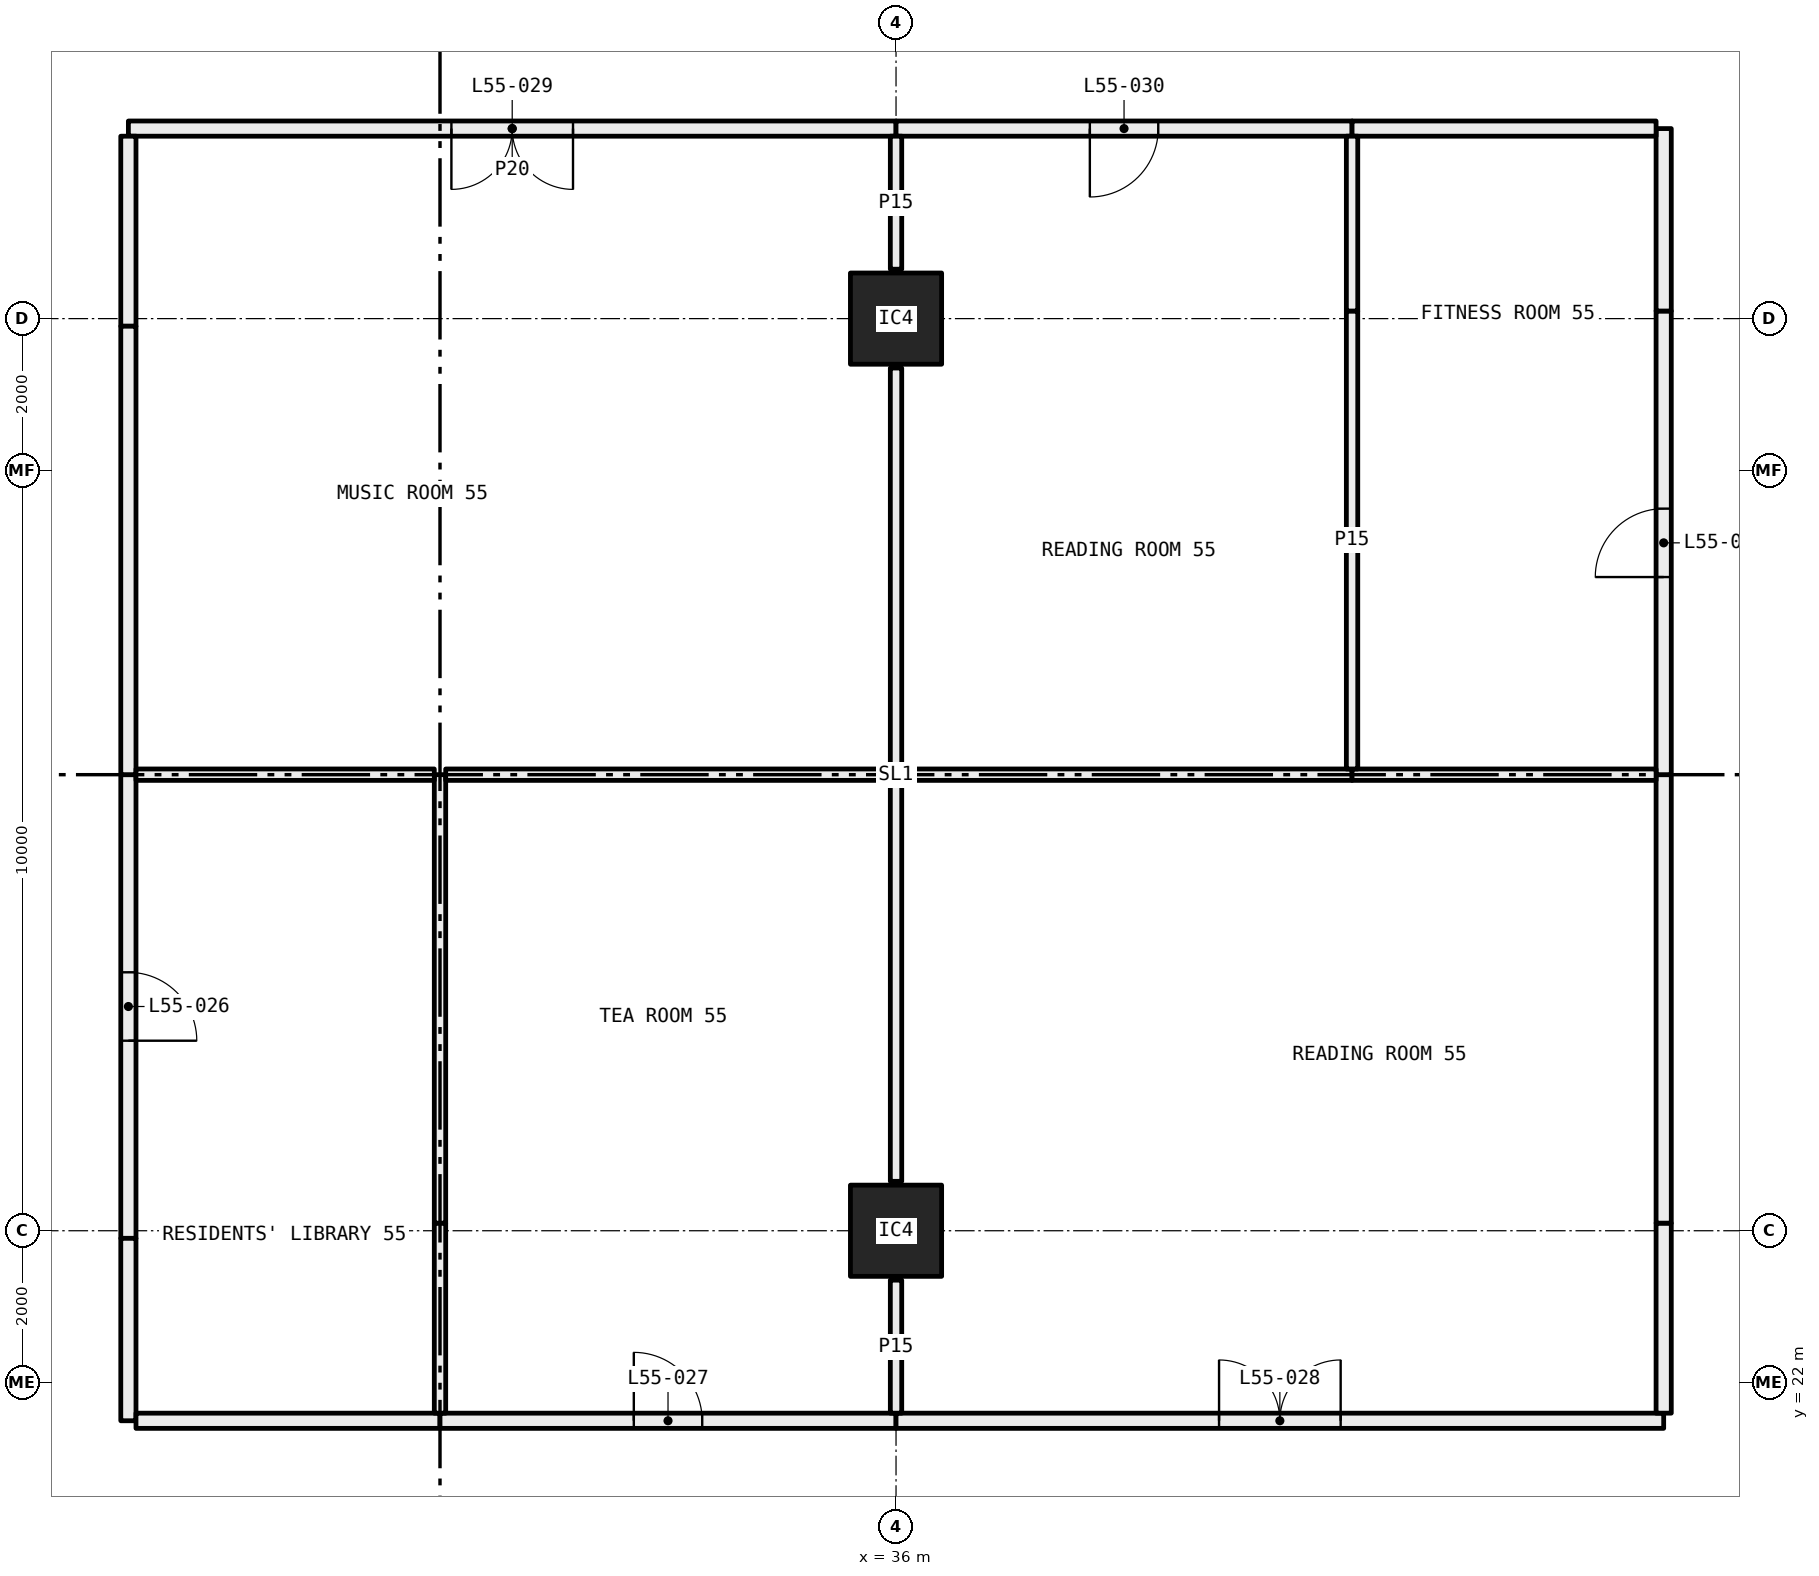
"""IFC4 building model, lengths in metres.
Left out: names, types, materials, properties, quantities, classifications, styles, units other than length and angle.
Written with IfcOpenShell. Run it as: python <this file> out.ifc"""

import sys

from ifc_helpers import new_model, si_unit, direction, frame, frame_2d, origin, origin_2d, place, context, subcontext, project, spatial, rectangle, hollow_rectangle, extrude, element, fill, save


model = new_model("IFC4")
c1 = context("Model", 3, precision=1e-05, world=origin(), true_north=direction((0.0, 1.0)))
c2 = subcontext(c1, "Body", "Model", "MODEL_VIEW")
j1 = project(units=[si_unit("LENGTHUNIT", "METRE"), si_unit("PLANEANGLEUNIT", "RADIAN")], contexts=[c1])
p1 = place(None, origin())
s1 = spatial("IfcSite", under=j1, at=p1, CompositionType="ELEMENT")
p2 = place(p1, origin())
s2 = spatial("IfcBuilding", under=s1, at=p2, CompositionType="ELEMENT")
p3 = place(p2, frame((0.0, 0.0, 206.55)))
s3 = spatial("IfcBuildingStorey", under=s2, at=p3, CompositionType="ELEMENT", Elevation=206.55)
for number, where, z_axis, x_axis in (
    (1, (36.0, 24.0, 0.0), (0.0, 0.0, 1.0), (1.0, 0.0, 0.0)),
    (2, (36.0, 36.0, 0.0), (0.0, 0.0, 1.0), (1.0, 0.0, 0.0)),
):
    element("IfcColumn", number, at=place(p3, frame(where, z_axis=z_axis, x_axis=x_axis)), inside=s3, PredefinedType="COLUMN", context=c2, shape_type="SweptSolid", body=[
        extrude(hollow_rectangle(XDim=1.2, YDim=1.2, WallThickness=0.05, at=origin_2d()), origin(), (0.0, 0.0, 1.0), 3.05),
    ])
p4 = place(p3, frame((25.9, 30.0, 0.0), z_axis=(0.0, 0.0, 1.0), x_axis=(0.0, -1.0, 0.0)))
e3 = element("IfcWall", 3, at=p4, inside=s3, PredefinedType="PARTITIONING", context=c2, shape_type="SweptSolid", body=[
    extrude(rectangle(XDim=6.1, YDim=0.2, at=frame_2d((3.05, 0.0))), origin(), (0.0, 0.0, 1.0), 2.45),
])
p5 = place(p4, frame((2.6, 0.0, 0.0)))
e4 = element("IfcOpeningElement", 4, at=p5, cuts=e3, PredefinedType="OPENING", context=c2, shape_type="SweptSolid", body=[
    extrude(rectangle(XDim=0.9, YDim=2.1, at=frame_2d((0.45, 1.05))), frame((0.0, 0.11, 0.0), z_axis=(0.0, -1.0, 0.0), x_axis=(1.0, 0.0, 0.0)), (0.0, 0.0, 1.0), 0.22),
])
p6 = place(p3, frame((25.9, 23.9, 0.0), z_axis=(0.0, 0.0, 1.0), x_axis=(0.0, -1.0, 0.0)))
e5 = element("IfcWall", 5, at=p6, inside=s3, PredefinedType="PARTITIONING", context=c2, shape_type="SweptSolid", body=[
    extrude(rectangle(XDim=2.4, YDim=0.2, at=frame_2d((1.2, 0.0))), origin(), (0.0, 0.0, 1.0), 3.05),
])
p7 = place(p3, frame((26.0, 21.5, 0.0), z_axis=(0.0, 0.0, 1.0), x_axis=(1.0, 0.0, 0.0)))
e6 = element("IfcWall", 6, at=p7, inside=s3, PredefinedType="PARTITIONING", context=c2, shape_type="SweptSolid", body=[
    extrude(rectangle(XDim=4.0, YDim=0.2, at=frame_2d((2.0, 0.0))), origin(), (0.0, 0.0, 1.0), 3.05),
])
p8 = place(p3, frame((30.0, 21.5, 0.0), z_axis=(0.0, 0.0, 1.0), x_axis=(1.0, 0.0, 0.0)))
e7 = element("IfcWall", 7, at=p8, inside=s3, PredefinedType="PARTITIONING", context=c2, shape_type="SweptSolid", body=[
    extrude(rectangle(XDim=6.0, YDim=0.2, at=frame_2d((3.0, 0.0))), origin(), (0.0, 0.0, 1.0), 2.45),
])
p9 = place(p8, frame((2.55, 0.0, 0.0)))
e8 = element("IfcOpeningElement", 8, at=p9, cuts=e7, PredefinedType="OPENING", context=c2, shape_type="SweptSolid", body=[
    extrude(rectangle(XDim=0.9, YDim=2.1, at=frame_2d((0.45, 1.05))), frame((0.0, 0.11, 0.0), z_axis=(0.0, -1.0, 0.0), x_axis=(1.0, 0.0, 0.0)), (0.0, 0.0, 1.0), 0.22),
])
p10 = place(p3, frame((36.0, 21.5, 0.0), z_axis=(0.0, 0.0, 1.0), x_axis=(1.0, 0.0, 0.0)))
e9 = element("IfcWall", 9, at=p10, inside=s3, PredefinedType="PARTITIONING", context=c2, shape_type="SweptSolid", body=[
    extrude(rectangle(XDim=10.1, YDim=0.2, at=frame_2d((5.05, 0.0))), origin(), (0.0, 0.0, 1.0), 2.45),
])
p11 = place(p10, frame((4.25, 0.0, 0.0)))
e10 = element("IfcOpeningElement", 10, at=p11, cuts=e9, PredefinedType="OPENING", context=c2, shape_type="SweptSolid", body=[
    extrude(rectangle(XDim=1.6, YDim=2.1, at=frame_2d((0.8, 1.05))), frame((0.0, 0.11, 0.0), z_axis=(0.0, -1.0, 0.0), x_axis=(1.0, 0.0, 0.0)), (0.0, 0.0, 1.0), 0.22),
])
p12 = place(p3, frame((46.1, 21.6, 0.0), z_axis=(0.0, 0.0, 1.0), x_axis=(0.0, 1.0, 0.0)))
e11 = element("IfcWall", 11, at=p12, inside=s3, PredefinedType="PARTITIONING", context=c2, shape_type="SweptSolid", body=[
    extrude(rectangle(XDim=2.5, YDim=0.2, at=frame_2d((1.25, 0.0))), origin(), (0.0, 0.0, 1.0), 2.45),
])
p13 = place(p3, frame((46.1, 24.1, 0.0), z_axis=(0.0, 0.0, 1.0), x_axis=(0.0, 1.0, 0.0)))
e12 = element("IfcWall", 12, at=p13, inside=s3, PredefinedType="PARTITIONING", context=c2, shape_type="SweptSolid", body=[
    extrude(rectangle(XDim=5.9, YDim=0.2, at=frame_2d((2.95, 0.0))), origin(), (0.0, 0.0, 1.0), 3.05),
])
p14 = place(p3, frame((36.0, 38.5, 0.0), z_axis=(0.0, 0.0, 1.0), x_axis=(-1.0, 0.0, 0.0)))
e13 = element("IfcWall", 13, at=p14, inside=s3, PredefinedType="PARTITIONING", context=c2, shape_type="SweptSolid", body=[
    extrude(rectangle(XDim=10.1, YDim=0.2, at=frame_2d((5.05, 0.0))), origin(), (0.0, 0.0, 1.0), 2.45),
])
p15 = place(p14, frame((4.25, 0.0, 0.0)))
e14 = element("IfcOpeningElement", 14, at=p15, cuts=e13, PredefinedType="OPENING", context=c2, shape_type="SweptSolid", body=[
    extrude(rectangle(XDim=1.6, YDim=2.1, at=frame_2d((0.8, 1.05))), frame((0.0, 0.11, 0.0), z_axis=(0.0, -1.0, 0.0), x_axis=(1.0, 0.0, 0.0)), (0.0, 0.0, 1.0), 0.22),
])
p16 = place(p3, frame((25.9, 38.4, 0.0), z_axis=(0.0, 0.0, 1.0), x_axis=(0.0, -1.0, 0.0)))
e15 = element("IfcWall", 15, at=p16, inside=s3, PredefinedType="PARTITIONING", context=c2, shape_type="SweptSolid", body=[
    extrude(rectangle(XDim=2.5, YDim=0.2, at=frame_2d((1.25, 0.0))), origin(), (0.0, 0.0, 1.0), 2.45),
])
p17 = place(p3, frame((25.9, 35.9, 0.0), z_axis=(0.0, 0.0, 1.0), x_axis=(0.0, -1.0, 0.0)))
e16 = element("IfcWall", 16, at=p17, inside=s3, PredefinedType="PARTITIONING", context=c2, shape_type="SweptSolid", body=[
    extrude(rectangle(XDim=5.9, YDim=0.2, at=frame_2d((2.95, 0.0))), origin(), (0.0, 0.0, 1.0), 3.05),
])
p18 = place(p3, frame((42.0, 38.5, 0.0), z_axis=(0.0, 0.0, 1.0), x_axis=(-1.0, 0.0, 0.0)))
e17 = element("IfcWall", 17, at=p18, inside=s3, PredefinedType="PARTITIONING", context=c2, shape_type="SweptSolid", body=[
    extrude(rectangle(XDim=6.0, YDim=0.2, at=frame_2d((3.0, 0.0))), origin(), (0.0, 0.0, 1.0), 2.45),
])
p19 = place(p18, frame((2.55, 0.0, 0.0)))
e18 = element("IfcOpeningElement", 18, at=p19, cuts=e17, PredefinedType="OPENING", context=c2, shape_type="SweptSolid", body=[
    extrude(rectangle(XDim=0.9, YDim=2.1, at=frame_2d((0.45, 1.05))), frame((0.0, 0.11, 0.0), z_axis=(0.0, -1.0, 0.0), x_axis=(1.0, 0.0, 0.0)), (0.0, 0.0, 1.0), 0.22),
])
p20 = place(p3, frame((46.1, 30.0, 0.0), z_axis=(0.0, 0.0, 1.0), x_axis=(0.0, 1.0, 0.0)))
e19 = element("IfcWall", 19, at=p20, inside=s3, PredefinedType="PARTITIONING", context=c2, shape_type="SweptSolid", body=[
    extrude(rectangle(XDim=6.1, YDim=0.2, at=frame_2d((3.05, 0.0))), origin(), (0.0, 0.0, 1.0), 2.45),
])
p21 = place(p20, frame((2.6, 0.0, 0.0)))
e20 = element("IfcOpeningElement", 20, at=p21, cuts=e19, PredefinedType="OPENING", context=c2, shape_type="SweptSolid", body=[
    extrude(rectangle(XDim=0.9, YDim=2.1, at=frame_2d((0.45, 1.05))), frame((0.0, 0.11, 0.0), z_axis=(0.0, -1.0, 0.0), x_axis=(1.0, 0.0, 0.0)), (0.0, 0.0, 1.0), 0.22),
])
p22 = place(p3, frame((46.1, 36.1, 0.0), z_axis=(0.0, 0.0, 1.0), x_axis=(0.0, 1.0, 0.0)))
e21 = element("IfcWall", 21, at=p22, inside=s3, PredefinedType="PARTITIONING", context=c2, shape_type="SweptSolid", body=[
    extrude(rectangle(XDim=2.4, YDim=0.2, at=frame_2d((1.2, 0.0))), origin(), (0.0, 0.0, 1.0), 3.05),
])
p23 = place(p3, frame((46.0, 38.5, 0.0), z_axis=(0.0, 0.0, 1.0), x_axis=(-1.0, 0.0, 0.0)))
e22 = element("IfcWall", 22, at=p23, inside=s3, PredefinedType="PARTITIONING", context=c2, shape_type="SweptSolid", body=[
    extrude(rectangle(XDim=4.0, YDim=0.2, at=frame_2d((2.0, 0.0))), origin(), (0.0, 0.0, 1.0), 3.05),
])
p24 = place(p3, frame((30.0, 21.6, 0.0), z_axis=(0.0, 0.0, 1.0), x_axis=(0.0, 1.0, 0.0)))
e23 = element("IfcWall", 23, at=p24, inside=s3, PredefinedType="PARTITIONING", context=c2, shape_type="SweptSolid", body=[
    extrude(rectangle(XDim=2.5, YDim=0.15, at=frame_2d((1.25, 0.0))), origin(), (0.0, 0.0, 1.0), 2.45),
])
p25 = place(p3, frame((30.0, 24.1, 0.0), z_axis=(0.0, 0.0, 1.0), x_axis=(0.0, 1.0, 0.0)))
e24 = element("IfcWall", 24, at=p25, inside=s3, PredefinedType="PARTITIONING", context=c2, shape_type="SweptSolid", body=[
    extrude(rectangle(XDim=5.9, YDim=0.15, at=frame_2d((2.95, 0.0))), origin(), (0.0, 0.0, 1.0), 3.05),
])
p26 = place(p3, frame((29.925, 30.0, 0.0), z_axis=(0.0, 0.0, 1.0), x_axis=(-1.0, 0.0, 0.0)))
e25 = element("IfcWall", 25, at=p26, inside=s3, PredefinedType="PARTITIONING", context=c2, shape_type="SweptSolid", body=[
    extrude(rectangle(XDim=3.925, YDim=0.15, at=frame_2d((1.962, 0.0))), origin(), (0.0, 0.0, 1.0), 3.05),
])
p27 = place(p3, frame((36.0, 21.6, 0.0), z_axis=(0.0, 0.0, 1.0), x_axis=(0.0, 1.0, 0.0)))
e26 = element("IfcWall", 26, at=p27, inside=s3, PredefinedType="PARTITIONING", context=c2, shape_type="SweptSolid", body=[
    extrude(rectangle(XDim=1.75, YDim=0.15, at=frame_2d((0.875, 0.0))), origin(), (0.0, 0.0, 1.0), 2.45),
])
p28 = place(p3, frame((36.0, 24.65, 0.0), z_axis=(0.0, 0.0, 1.0), x_axis=(0.0, 1.0, 0.0)))
e27 = element("IfcWall", 27, at=p28, inside=s3, PredefinedType="PARTITIONING", context=c2, shape_type="SweptSolid", body=[
    extrude(rectangle(XDim=5.35, YDim=0.15, at=frame_2d((2.675, 0.0))), origin(), (0.0, 0.0, 1.0), 2.45),
])
p29 = place(p3, frame((35.925, 30.0, 0.0), z_axis=(0.0, 0.0, 1.0), x_axis=(-1.0, 0.0, 0.0)))
e28 = element("IfcWall", 28, at=p29, inside=s3, PredefinedType="PARTITIONING", context=c2, shape_type="SweptSolid", body=[
    extrude(rectangle(XDim=5.85, YDim=0.15, at=frame_2d((2.925, 0.0))), origin(), (0.0, 0.0, 1.0), 2.45),
])
p30 = place(p3, frame((42.0, 30.0, 0.0), z_axis=(0.0, 0.0, 1.0), x_axis=(-1.0, 0.0, 0.0)))
e29 = element("IfcWall", 29, at=p30, inside=s3, PredefinedType="PARTITIONING", context=c2, shape_type="SweptSolid", body=[
    extrude(rectangle(XDim=5.925, YDim=0.15, at=frame_2d((2.962, 0.0))), origin(), (0.0, 0.0, 1.0), 2.45),
])
p31 = place(p3, frame((46.0, 30.0, 0.0), z_axis=(0.0, 0.0, 1.0), x_axis=(-1.0, 0.0, 0.0)))
e30 = element("IfcWall", 30, at=p31, inside=s3, PredefinedType="PARTITIONING", context=c2, shape_type="SweptSolid", body=[
    extrude(rectangle(XDim=4.0, YDim=0.15, at=frame_2d((2.0, 0.0))), origin(), (0.0, 0.0, 1.0), 3.05),
])
p32 = place(p3, frame((36.0, 30.075, 0.0), z_axis=(0.0, 0.0, 1.0), x_axis=(0.0, 1.0, 0.0)))
e31 = element("IfcWall", 31, at=p32, inside=s3, PredefinedType="PARTITIONING", context=c2, shape_type="SweptSolid", body=[
    extrude(rectangle(XDim=5.275, YDim=0.15, at=frame_2d((2.638, 0.0))), origin(), (0.0, 0.0, 1.0), 2.45),
])
p33 = place(p3, frame((36.0, 36.65, 0.0), z_axis=(0.0, 0.0, 1.0), x_axis=(0.0, 1.0, 0.0)))
e32 = element("IfcWall", 32, at=p33, inside=s3, PredefinedType="PARTITIONING", context=c2, shape_type="SweptSolid", body=[
    extrude(rectangle(XDim=1.75, YDim=0.15, at=frame_2d((0.875, 0.0))), origin(), (0.0, 0.0, 1.0), 2.45),
])
p34 = place(p3, frame((42.0, 30.075, 0.0), z_axis=(0.0, 0.0, 1.0), x_axis=(0.0, 1.0, 0.0)))
e33 = element("IfcWall", 33, at=p34, inside=s3, PredefinedType="PARTITIONING", context=c2, shape_type="SweptSolid", body=[
    extrude(rectangle(XDim=6.025, YDim=0.15, at=frame_2d((3.013, 0.0))), origin(), (0.0, 0.0, 1.0), 2.45),
])
p35 = place(p3, frame((42.0, 36.1, 0.0), z_axis=(0.0, 0.0, 1.0), x_axis=(0.0, 1.0, 0.0)))
e34 = element("IfcWall", 34, at=p35, inside=s3, PredefinedType="PARTITIONING", context=c2, shape_type="SweptSolid", body=[
    extrude(rectangle(XDim=2.3, YDim=0.15, at=frame_2d((1.15, 0.0))), origin(), (0.0, 0.0, 1.0), 3.05),
])
p36 = place(p5, origin())
e35 = element("IfcDoor", 35, at=p36, inside=s3, OperationType="SINGLE_SWING_LEFT", PredefinedType="DOOR", context=c2, shape_type="SweptSolid", body=[
    extrude(rectangle(XDim=0.9, YDim=2.1, at=frame_2d((0.45, 1.05))), frame((0.0, 0.025, 0.0), z_axis=(0.0, -1.0, 0.0), x_axis=(1.0, 0.0, 0.0)), (0.0, 0.0, 1.0), 0.05),
])
fill(e4, e35)
p37 = place(p9, origin())
e36 = element("IfcDoor", 36, at=p37, inside=s3, OperationType="SINGLE_SWING_RIGHT", PredefinedType="DOOR", context=c2, shape_type="SweptSolid", body=[
    extrude(rectangle(XDim=0.9, YDim=2.1, at=frame_2d((0.45, 1.05))), frame((0.0, 0.025, 0.0), z_axis=(0.0, -1.0, 0.0), x_axis=(1.0, 0.0, 0.0)), (0.0, 0.0, 1.0), 0.05),
])
fill(e8, e36)
p38 = place(p11, origin())
e37 = element("IfcDoor", 37, at=p38, inside=s3, OperationType="DOUBLE_DOOR_SINGLE_SWING", PredefinedType="DOOR", context=c2, shape_type="SweptSolid", body=[
    extrude(rectangle(XDim=1.6, YDim=2.1, at=frame_2d((0.8, 1.05))), frame((0.0, 0.025, 0.0), z_axis=(0.0, -1.0, 0.0), x_axis=(1.0, 0.0, 0.0)), (0.0, 0.0, 1.0), 0.05),
])
fill(e10, e37)
p39 = place(p15, origin())
e38 = element("IfcDoor", 38, at=p39, inside=s3, OperationType="DOUBLE_DOOR_SINGLE_SWING", PredefinedType="DOOR", context=c2, shape_type="SweptSolid", body=[
    extrude(rectangle(XDim=1.6, YDim=2.1, at=frame_2d((0.8, 1.05))), frame((0.0, 0.025, 0.0), z_axis=(0.0, -1.0, 0.0), x_axis=(1.0, 0.0, 0.0)), (0.0, 0.0, 1.0), 0.05),
])
fill(e14, e38)
p40 = place(p19, origin())
e39 = element("IfcDoor", 39, at=p40, inside=s3, OperationType="SINGLE_SWING_LEFT", PredefinedType="DOOR", context=c2, shape_type="SweptSolid", body=[
    extrude(rectangle(XDim=0.9, YDim=2.1, at=frame_2d((0.45, 1.05))), frame((0.0, 0.025, 0.0), z_axis=(0.0, -1.0, 0.0), x_axis=(1.0, 0.0, 0.0)), (0.0, 0.0, 1.0), 0.05),
])
fill(e18, e39)
p41 = place(p21, origin())
e40 = element("IfcDoor", 40, at=p41, inside=s3, OperationType="SINGLE_SWING_RIGHT", PredefinedType="DOOR", context=c2, shape_type="SweptSolid", body=[
    extrude(rectangle(XDim=0.9, YDim=2.1, at=frame_2d((0.45, 1.05))), frame((0.0, 0.025, 0.0), z_axis=(0.0, -1.0, 0.0), x_axis=(1.0, 0.0, 0.0)), (0.0, 0.0, 1.0), 0.05),
])
fill(e20, e40)
save(model, sys.argv[1])
